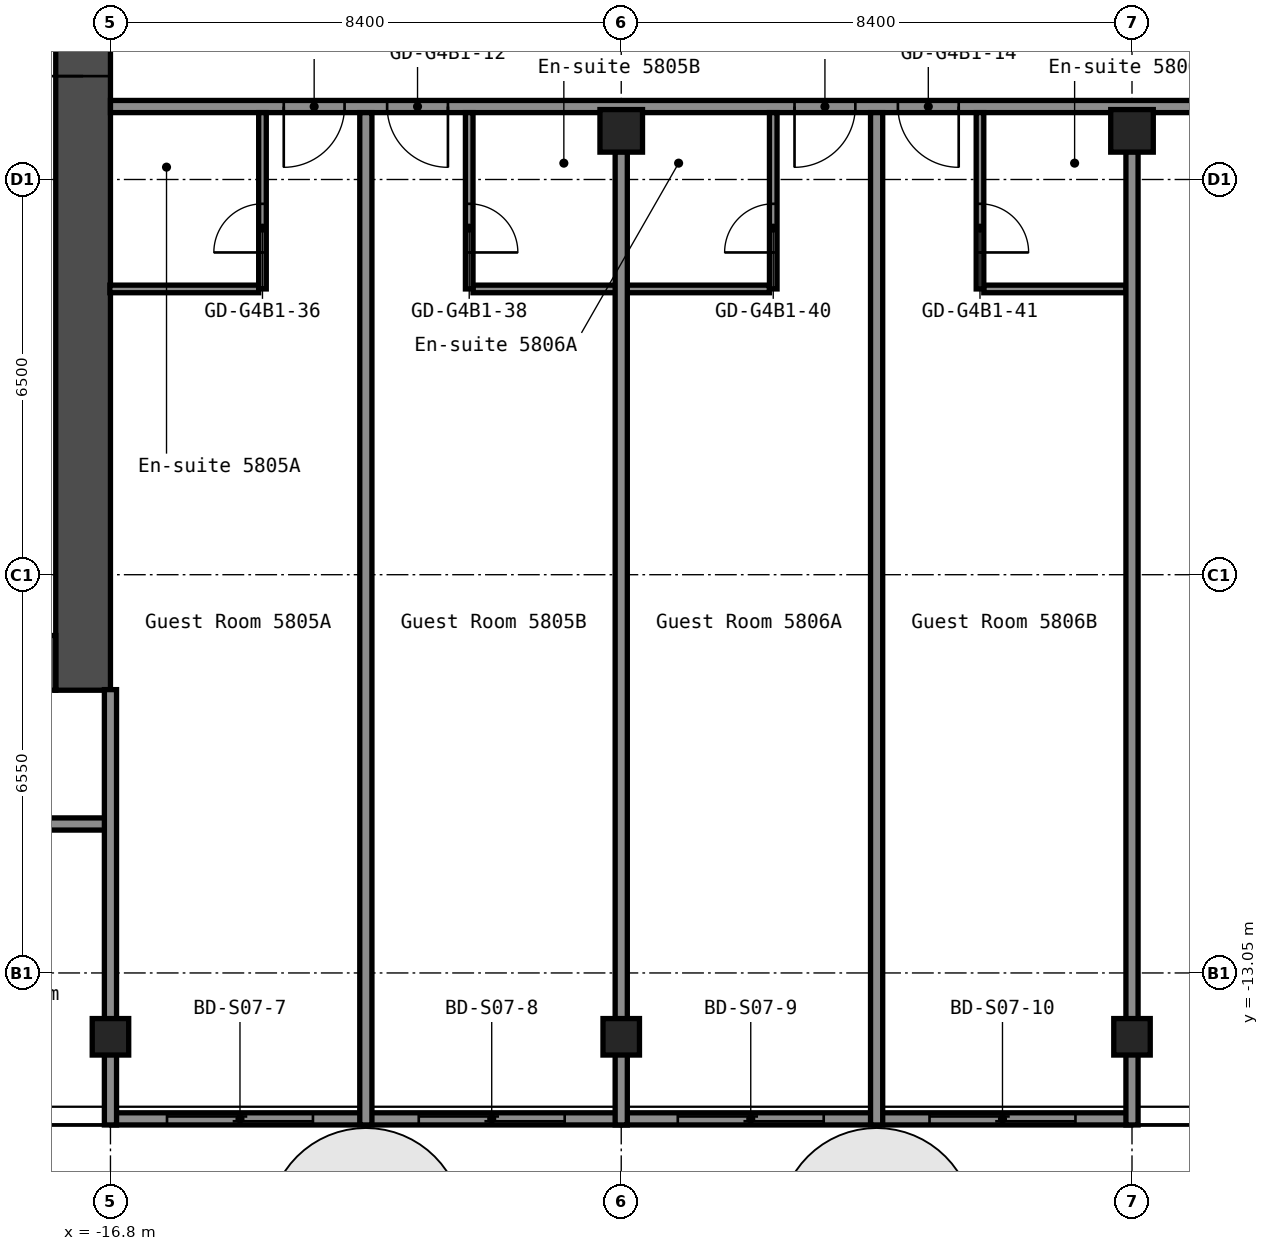
"""IFC4 building model, lengths in metres.
Left out: names, types, materials, properties, quantities, classifications, styles, units other than length and angle.
Written with IfcOpenShell. Run it as: python <this file> out.ifc"""

import sys

from ifc_helpers import new_model, si_unit, direction, frame, frame_2d, origin, origin_2d, place, context, subcontext, project, spatial, rectangle, hollow_rectangle, extrude, element, fill, save


model = new_model("IFC4")
c1 = context("Model", 3, precision=1e-05, world=origin(), true_north=direction((0.0, 1.0)))
c2 = subcontext(c1, "Body", "Model", "MODEL_VIEW")
j1 = project(units=[si_unit("LENGTHUNIT", "METRE"), si_unit("PLANEANGLEUNIT", "RADIAN")], contexts=[c1])
p1 = place(None, origin())
s1 = spatial("IfcSite", under=j1, at=p1, CompositionType="ELEMENT")
p2 = place(p1, origin())
s2 = spatial("IfcBuilding", under=s1, at=p2, CompositionType="ELEMENT")
p3 = place(p2, frame((0.0, 0.0, 205.8)))
s3 = spatial("IfcBuildingStorey", under=s2, at=p3, CompositionType="ELEMENT", Elevation=205.8)
for number, where, z_axis, x_axis in (
    (1, (-16.8, -14.1, 0.0), (0.0, 0.0, 1.0), (1.0, 0.0, 0.0)),
    (2, (-8.4, -14.1, 0.0), (0.0, 0.0, 1.0), (1.0, 0.0, 0.0)),
):
    element("IfcColumn", number, at=place(p3, frame(where, z_axis=z_axis, x_axis=x_axis)), inside=s3, PredefinedType="COLUMN", context=c2, shape_type="SweptSolid", body=[
        extrude(hollow_rectangle(XDim=0.6, YDim=0.6, WallThickness=0.025, InnerFilletRadius=0.038, OuterFilletRadius=0.062, at=origin_2d()), origin(), (0.0, 0.0, 1.0), 2.75),
    ])
p4 = place(p3, frame((-8.4, 0.8, 0.0), z_axis=(0.0, 0.0, 1.0), x_axis=(1.0, 0.0, 0.0)))
e3 = element("IfcColumn", 3, at=p4, inside=s3, PredefinedType="COLUMN", context=c2, shape_type="SweptSolid", body=[
    extrude(hollow_rectangle(XDim=0.7, YDim=0.7, WallThickness=0.028, at=origin_2d()), origin(), (0.0, 0.0, 1.0), 2.75),
])
p5 = place(p3, frame((0.0, -14.1, 0.0), z_axis=(0.0, 0.0, 1.0), x_axis=(1.0, 0.0, 0.0)))
e4 = element("IfcColumn", 4, at=p5, inside=s3, PredefinedType="COLUMN", context=c2, shape_type="SweptSolid", body=[
    extrude(hollow_rectangle(XDim=0.6, YDim=0.6, WallThickness=0.025, InnerFilletRadius=0.038, OuterFilletRadius=0.062, at=origin_2d()), origin(), (0.0, 0.0, 1.0), 2.75),
])
p6 = place(p3, frame((0.0, 0.8, 0.0), z_axis=(0.0, 0.0, 1.0), x_axis=(1.0, 0.0, 0.0)))
e5 = element("IfcColumn", 5, at=p6, inside=s3, PredefinedType="COLUMN", context=c2, shape_type="SweptSolid", body=[
    extrude(hollow_rectangle(XDim=0.7, YDim=0.7, WallThickness=0.028, at=origin_2d()), origin(), (0.0, 0.0, 1.0), 2.75),
])
p7 = place(p3, frame((-17.25, -8.4, 0.0), z_axis=(0.0, 0.0, 1.0), x_axis=(0.0, 1.0, 0.0)))
e6 = element("IfcWall", 6, at=p7, inside=s3, PredefinedType="SHEAR", context=c2, shape_type="SweptSolid", body=[
    extrude(rectangle(XDim=16.8, YDim=0.9, at=frame_2d((8.4, 0.0))), origin(), (0.0, 0.0, 1.0), 2.75),
])
p8 = place(p7, frame((10.1, 0.0, 0.0)))
e7 = element("IfcOpeningElement", 7, at=p8, cuts=e6, PredefinedType="OPENING", context=c2, shape_type="SweptSolid", body=[
    extrude(rectangle(XDim=1.6, YDim=2.1, at=frame_2d((0.8, 1.05))), frame((0.0, 0.46, 0.0), z_axis=(0.0, -1.0, 0.0), x_axis=(1.0, 0.0, 0.0)), (0.0, 0.0, 1.0), 0.92),
])
p9 = place(p3, frame((-32.7, -7.95, 0.0), z_axis=(0.0, 0.0, 1.0), x_axis=(1.0, 0.0, 0.0)))
e8 = element("IfcWall", 8, at=p9, inside=s3, PredefinedType="SHEAR", context=c2, shape_type="SweptSolid", body=[
    extrude(rectangle(XDim=15.0, YDim=0.9, at=frame_2d((7.5, 0.0))), origin(), (0.0, 0.0, 1.0), 2.75),
])
p10 = place(p9, frame((11.45, 0.0, 0.0)))
e9 = element("IfcOpeningElement", 9, at=p10, cuts=e8, PredefinedType="OPENING", context=c2, shape_type="SweptSolid", body=[
    extrude(rectangle(XDim=1.0, YDim=2.1, at=frame_2d((0.5, 1.05))), frame((0.0, 0.46, 0.0), z_axis=(0.0, -1.0, 0.0), x_axis=(1.0, 0.0, 0.0)), (0.0, 0.0, 1.0), 0.92),
])
p11 = place(p3, frame((-38.1, -10.6, 0.0), z_axis=(0.0, 0.0, 1.0), x_axis=(1.0, 0.0, 0.0)))
e10 = element("IfcWall", 10, at=p11, inside=s3, PredefinedType="PARTITIONING", context=c2, shape_type="SweptSolid", body=[
    extrude(rectangle(XDim=21.3, YDim=0.2, at=frame_2d((10.65, 0.0))), origin(), (0.0, 0.0, 1.0), 2.75),
])
p12 = place(p11, frame((1.95, 0.0, 0.0)))
e11 = element("IfcOpeningElement", 11, at=p12, cuts=e10, PredefinedType="OPENING", context=c2, shape_type="SweptSolid", body=[
    extrude(rectangle(XDim=0.9, YDim=2.1, at=frame_2d((0.45, 1.05))), frame((0.0, 0.11, 0.0), z_axis=(0.0, -1.0, 0.0), x_axis=(1.0, 0.0, 0.0)), (0.0, 0.0, 1.0), 0.22),
])
p13 = place(p11, frame((6.485, 0.0, 0.0)))
e12 = element("IfcOpeningElement", 12, at=p13, cuts=e10, PredefinedType="OPENING", context=c2, shape_type="SweptSolid", body=[
    extrude(rectangle(XDim=0.9, YDim=2.1, at=frame_2d((0.45, 1.05))), frame((0.0, 0.11, 0.0), z_axis=(0.0, -1.0, 0.0), x_axis=(1.0, 0.0, 0.0)), (0.0, 0.0, 1.0), 0.22),
])
p14 = place(p11, frame((10.685, 0.0, 0.0)))
e13 = element("IfcOpeningElement", 13, at=p14, cuts=e10, PredefinedType="OPENING", context=c2, shape_type="SweptSolid", body=[
    extrude(rectangle(XDim=0.9, YDim=2.1, at=frame_2d((0.45, 1.05))), frame((0.0, 0.11, 0.0), z_axis=(0.0, -1.0, 0.0), x_axis=(1.0, 0.0, 0.0)), (0.0, 0.0, 1.0), 0.22),
])
p15 = place(p11, frame((14.215, 0.0, 0.0)))
e14 = element("IfcOpeningElement", 14, at=p15, cuts=e10, PredefinedType="OPENING", context=c2, shape_type="SweptSolid", body=[
    extrude(rectangle(XDim=0.9, YDim=2.1, at=frame_2d((0.45, 1.05))), frame((0.0, 0.11, 0.0), z_axis=(0.0, -1.0, 0.0), x_axis=(1.0, 0.0, 0.0)), (0.0, 0.0, 1.0), 0.22),
])
p16 = place(p11, frame((18.415, 0.0, 0.0)))
e15 = element("IfcOpeningElement", 15, at=p16, cuts=e10, PredefinedType="OPENING", context=c2, shape_type="SweptSolid", body=[
    extrude(rectangle(XDim=0.9, YDim=2.1, at=frame_2d((0.45, 1.05))), frame((0.0, 0.11, 0.0), z_axis=(0.0, -1.0, 0.0), x_axis=(1.0, 0.0, 0.0)), (0.0, 0.0, 1.0), 0.22),
])
p17 = place(p3, frame((-16.81, -1.8, 0.0), z_axis=(0.0, 0.0, 1.0), x_axis=(1.0, 0.0, 0.0)))
e16 = element("IfcWall", 16, at=p17, inside=s3, PredefinedType="PARTITIONING", context=c2, shape_type="SweptSolid", body=[
    extrude(rectangle(XDim=2.448, YDim=0.125, at=frame_2d((1.224, 0.0))), origin(), (0.0, 0.0, 1.0), 2.75),
])
p18 = place(p3, frame((-10.837, -1.8, 0.0), z_axis=(0.0, 0.0, 1.0), x_axis=(1.0, 0.0, 0.0)))
e17 = element("IfcWall", 17, at=p18, inside=s3, PredefinedType="PARTITIONING", context=c2, shape_type="SweptSolid", body=[
    extrude(rectangle(XDim=4.875, YDim=0.125, at=frame_2d((2.438, 0.0))), origin(), (0.0, 0.0, 1.0), 2.75),
])
p19 = place(p3, frame((-2.438, -1.8, 0.0), z_axis=(0.0, 0.0, 1.0), x_axis=(1.0, 0.0, 0.0)))
e18 = element("IfcWall", 18, at=p19, inside=s3, PredefinedType="PARTITIONING", context=c2, shape_type="SweptSolid", body=[
    extrude(rectangle(XDim=2.337, YDim=0.125, at=frame_2d((1.169, 0.0))), origin(), (0.0, 0.0, 1.0), 2.75),
])
p20 = place(p3, frame((-16.8, 1.2, 0.0), z_axis=(0.0, 0.0, 1.0), x_axis=(1.0, 0.0, 0.0)))
e19 = element("IfcWall", 19, at=p20, inside=s3, PredefinedType="PARTITIONING", context=c2, shape_type="SweptSolid", body=[
    extrude(rectangle(XDim=33.6, YDim=0.2, at=frame_2d((16.8, 0.0))), origin(), (0.0, 0.0, 1.0), 2.75),
])
p21 = place(p20, frame((2.85, 0.0, 0.0)))
e20 = element("IfcOpeningElement", 20, at=p21, cuts=e19, PredefinedType="OPENING", context=c2, shape_type="SweptSolid", body=[
    extrude(rectangle(XDim=1.0, YDim=2.1, at=frame_2d((0.5, 1.05))), frame((0.0, 0.11, 0.0), z_axis=(0.0, -1.0, 0.0), x_axis=(1.0, 0.0, 0.0)), (0.0, 0.0, 1.0), 0.22),
])
p22 = place(p20, frame((4.55, 0.0, 0.0)))
e21 = element("IfcOpeningElement", 21, at=p22, cuts=e19, PredefinedType="OPENING", context=c2, shape_type="SweptSolid", body=[
    extrude(rectangle(XDim=1.0, YDim=2.1, at=frame_2d((0.5, 1.05))), frame((0.0, 0.11, 0.0), z_axis=(0.0, -1.0, 0.0), x_axis=(1.0, 0.0, 0.0)), (0.0, 0.0, 1.0), 0.22),
])
p23 = place(p20, frame((11.25, 0.0, 0.0)))
e22 = element("IfcOpeningElement", 22, at=p23, cuts=e19, PredefinedType="OPENING", context=c2, shape_type="SweptSolid", body=[
    extrude(rectangle(XDim=1.0, YDim=2.1, at=frame_2d((0.5, 1.05))), frame((0.0, 0.11, 0.0), z_axis=(0.0, -1.0, 0.0), x_axis=(1.0, 0.0, 0.0)), (0.0, 0.0, 1.0), 0.22),
])
p24 = place(p20, frame((12.95, 0.0, 0.0)))
e23 = element("IfcOpeningElement", 23, at=p24, cuts=e19, PredefinedType="OPENING", context=c2, shape_type="SweptSolid", body=[
    extrude(rectangle(XDim=1.0, YDim=2.1, at=frame_2d((0.5, 1.05))), frame((0.0, 0.11, 0.0), z_axis=(0.0, -1.0, 0.0), x_axis=(1.0, 0.0, 0.0)), (0.0, 0.0, 1.0), 0.22),
])
p25 = place(p20, frame((20.5, 0.0, 0.0)))
e24 = element("IfcOpeningElement", 24, at=p25, cuts=e19, PredefinedType="OPENING", context=c2, shape_type="SweptSolid", body=[
    extrude(rectangle(XDim=1.0, YDim=2.1, at=frame_2d((0.5, 1.05))), frame((0.0, 0.11, 0.0), z_axis=(0.0, -1.0, 0.0), x_axis=(1.0, 0.0, 0.0)), (0.0, 0.0, 1.0), 0.22),
])
p26 = place(p20, frame((28.05, 0.0, 0.0)))
e25 = element("IfcOpeningElement", 25, at=p26, cuts=e19, PredefinedType="OPENING", context=c2, shape_type="SweptSolid", body=[
    extrude(rectangle(XDim=1.0, YDim=2.1, at=frame_2d((0.5, 1.05))), frame((0.0, 0.11, 0.0), z_axis=(0.0, -1.0, 0.0), x_axis=(1.0, 0.0, 0.0)), (0.0, 0.0, 1.0), 0.22),
])
p27 = place(p20, frame((29.75, 0.0, 0.0)))
e26 = element("IfcOpeningElement", 26, at=p27, cuts=e19, PredefinedType="OPENING", context=c2, shape_type="SweptSolid", body=[
    extrude(rectangle(XDim=1.0, YDim=2.1, at=frame_2d((0.5, 1.05))), frame((0.0, 0.11, 0.0), z_axis=(0.0, -1.0, 0.0), x_axis=(1.0, 0.0, 0.0)), (0.0, 0.0, 1.0), 0.22),
])
p28 = place(p3, frame((-16.8, -15.55, 0.0), z_axis=(0.0, 0.0, 1.0), x_axis=(0.0, 1.0, 0.0)))
e27 = element("IfcWall", 27, at=p28, inside=s3, PredefinedType="PARTITIONING", context=c2, shape_type="SweptSolid", body=[
    extrude(rectangle(XDim=7.16, YDim=0.2, at=frame_2d((3.58, 0.0))), origin(), (0.0, 0.0, 1.0), 2.75),
])
p29 = place(p3, frame((-14.3, -1.8, 0.0), z_axis=(0.0, 0.0, 1.0), x_axis=(0.0, 1.0, 0.0)))
e28 = element("IfcWall", 28, at=p29, inside=s3, PredefinedType="PARTITIONING", context=c2, shape_type="SweptSolid", body=[
    extrude(rectangle(XDim=2.9, YDim=0.125, at=frame_2d((1.45, 0.0))), origin(), (0.0, 0.0, 1.0), 2.75),
])
p30 = place(p29, frame((0.6, 0.0, 0.0)))
e29 = element("IfcOpeningElement", 29, at=p30, cuts=e28, PredefinedType="OPENING", context=c2, shape_type="SweptSolid", body=[
    extrude(rectangle(XDim=0.8, YDim=2.1, at=frame_2d((0.4, 1.05))), frame((0.0, 0.073, 0.0), z_axis=(0.0, -1.0, 0.0), x_axis=(1.0, 0.0, 0.0)), (0.0, 0.0, 1.0), 0.145),
])
p31 = place(p3, frame((-12.6, -15.55, 0.0), z_axis=(0.0, 0.0, 1.0), x_axis=(0.0, 1.0, 0.0)))
e30 = element("IfcWall", 30, at=p31, inside=s3, PredefinedType="PARTITIONING", context=c2, shape_type="SweptSolid", body=[
    extrude(rectangle(XDim=16.65, YDim=0.2, at=frame_2d((8.325, 0.0))), origin(), (0.0, 0.0, 1.0), 2.75),
])
p32 = place(p3, frame((-10.9, -1.8, 0.0), z_axis=(0.0, 0.0, 1.0), x_axis=(0.0, 1.0, 0.0)))
e31 = element("IfcWall", 31, at=p32, inside=s3, PredefinedType="PARTITIONING", context=c2, shape_type="SweptSolid", body=[
    extrude(rectangle(XDim=2.9, YDim=0.125, at=frame_2d((1.45, 0.0))), origin(), (0.0, 0.0, 1.0), 2.75),
])
p33 = place(p32, frame((0.6, 0.0, 0.0)))
e32 = element("IfcOpeningElement", 32, at=p33, cuts=e31, PredefinedType="OPENING", context=c2, shape_type="SweptSolid", body=[
    extrude(rectangle(XDim=0.8, YDim=2.1, at=frame_2d((0.4, 1.05))), frame((0.0, 0.073, 0.0), z_axis=(0.0, -1.0, 0.0), x_axis=(1.0, 0.0, 0.0)), (0.0, 0.0, 1.0), 0.145),
])
p34 = place(p3, frame((-8.4, -15.55, 0.0), z_axis=(0.0, 0.0, 1.0), x_axis=(0.0, 1.0, 0.0)))
e33 = element("IfcWall", 33, at=p34, inside=s3, PredefinedType="PARTITIONING", context=c2, shape_type="SweptSolid", body=[
    extrude(rectangle(XDim=16.01, YDim=0.2, at=frame_2d((8.005, 0.0))), origin(), (0.0, 0.0, 1.0), 2.75),
])
p35 = place(p3, frame((-5.9, -1.8, 0.0), z_axis=(0.0, 0.0, 1.0), x_axis=(0.0, 1.0, 0.0)))
e34 = element("IfcWall", 34, at=p35, inside=s3, PredefinedType="PARTITIONING", context=c2, shape_type="SweptSolid", body=[
    extrude(rectangle(XDim=2.9, YDim=0.125, at=frame_2d((1.45, 0.0))), origin(), (0.0, 0.0, 1.0), 2.75),
])
p36 = place(p35, frame((0.6, 0.0, 0.0)))
e35 = element("IfcOpeningElement", 35, at=p36, cuts=e34, PredefinedType="OPENING", context=c2, shape_type="SweptSolid", body=[
    extrude(rectangle(XDim=0.8, YDim=2.1, at=frame_2d((0.4, 1.05))), frame((0.0, 0.073, 0.0), z_axis=(0.0, -1.0, 0.0), x_axis=(1.0, 0.0, 0.0)), (0.0, 0.0, 1.0), 0.145),
])
p37 = place(p3, frame((-4.2, -15.55, 0.0), z_axis=(0.0, 0.0, 1.0), x_axis=(0.0, 1.0, 0.0)))
e36 = element("IfcWall", 36, at=p37, inside=s3, PredefinedType="PARTITIONING", context=c2, shape_type="SweptSolid", body=[
    extrude(rectangle(XDim=16.65, YDim=0.2, at=frame_2d((8.325, 0.0))), origin(), (0.0, 0.0, 1.0), 2.75),
])
p38 = place(p3, frame((-2.5, -1.8, 0.0), z_axis=(0.0, 0.0, 1.0), x_axis=(0.0, 1.0, 0.0)))
e37 = element("IfcWall", 37, at=p38, inside=s3, PredefinedType="PARTITIONING", context=c2, shape_type="SweptSolid", body=[
    extrude(rectangle(XDim=2.9, YDim=0.125, at=frame_2d((1.45, 0.0))), origin(), (0.0, 0.0, 1.0), 2.75),
])
p39 = place(p38, frame((0.6, 0.0, 0.0)))
e38 = element("IfcOpeningElement", 38, at=p39, cuts=e37, PredefinedType="OPENING", context=c2, shape_type="SweptSolid", body=[
    extrude(rectangle(XDim=0.8, YDim=2.1, at=frame_2d((0.4, 1.05))), frame((0.0, 0.073, 0.0), z_axis=(0.0, -1.0, 0.0), x_axis=(1.0, 0.0, 0.0)), (0.0, 0.0, 1.0), 0.145),
])
p40 = place(p3, frame((0.0, -15.55, 0.0), z_axis=(0.0, 0.0, 1.0), x_axis=(0.0, 1.0, 0.0)))
e39 = element("IfcWall", 39, at=p40, inside=s3, PredefinedType="PARTITIONING", context=c2, shape_type="SweptSolid", body=[
    extrude(rectangle(XDim=16.01, YDim=0.2, at=frame_2d((8.005, 0.0))), origin(), (0.0, 0.0, 1.0), 2.75),
])
p41 = place(p3, frame((-16.78, -15.45, 0.0), z_axis=(0.0, 0.0, 1.0), x_axis=(1.0, 0.0, 0.0)))
p42 = place(p41, frame((0.91, 0.0, 0.0)))
p43 = place(p42, frame((2.4, 0.0, 0.0), z_axis=(0.0, 0.0, 1.0), x_axis=(-1.0, 0.0, 0.0)))
e40 = element("IfcDoor", 40, at=p43, inside=s3, OperationType="SLIDING_TO_LEFT", PredefinedType="DOOR", context=c2, shape_type="SweptSolid", body=[
    extrude(rectangle(XDim=2.4, YDim=2.2, at=frame_2d((1.2, 1.1))), frame((0.0, 0.025, 0.0), z_axis=(0.0, -1.0, 0.0), x_axis=(1.0, 0.0, 0.0)), (0.0, 0.0, 1.0), 0.05),
])
p44 = place(p3, frame((-12.64, -15.45, 0.0), z_axis=(0.0, 0.0, 1.0), x_axis=(1.0, 0.0, 0.0)))
p45 = place(p44, frame((0.91, 0.0, 0.0)))
p46 = place(p45, frame((2.4, 0.0, 0.0), z_axis=(0.0, 0.0, 1.0), x_axis=(-1.0, 0.0, 0.0)))
e41 = element("IfcDoor", 41, at=p46, inside=s3, OperationType="SLIDING_TO_LEFT", PredefinedType="DOOR", context=c2, shape_type="SweptSolid", body=[
    extrude(rectangle(XDim=2.4, YDim=2.2, at=frame_2d((1.2, 1.1))), frame((0.0, 0.025, 0.0), z_axis=(0.0, -1.0, 0.0), x_axis=(1.0, 0.0, 0.0)), (0.0, 0.0, 1.0), 0.05),
])
p47 = place(p3, frame((-8.38, -15.45, 0.0), z_axis=(0.0, 0.0, 1.0), x_axis=(1.0, 0.0, 0.0)))
p48 = place(p47, frame((0.91, 0.0, 0.0)))
p49 = place(p48, frame((2.4, 0.0, 0.0), z_axis=(0.0, 0.0, 1.0), x_axis=(-1.0, 0.0, 0.0)))
e42 = element("IfcDoor", 42, at=p49, inside=s3, OperationType="SLIDING_TO_LEFT", PredefinedType="DOOR", context=c2, shape_type="SweptSolid", body=[
    extrude(rectangle(XDim=2.4, YDim=2.2, at=frame_2d((1.2, 1.1))), frame((0.0, 0.025, 0.0), z_axis=(0.0, -1.0, 0.0), x_axis=(1.0, 0.0, 0.0)), (0.0, 0.0, 1.0), 0.05),
])
p50 = place(p3, frame((-4.24, -15.45, 0.0), z_axis=(0.0, 0.0, 1.0), x_axis=(1.0, 0.0, 0.0)))
p51 = place(p50, frame((0.91, 0.0, 0.0)))
p52 = place(p51, frame((2.4, 0.0, 0.0), z_axis=(0.0, 0.0, 1.0), x_axis=(-1.0, 0.0, 0.0)))
e43 = element("IfcDoor", 43, at=p52, inside=s3, OperationType="SLIDING_TO_LEFT", PredefinedType="DOOR", context=c2, shape_type="SweptSolid", body=[
    extrude(rectangle(XDim=2.4, YDim=2.2, at=frame_2d((1.2, 1.1))), frame((0.0, 0.025, 0.0), z_axis=(0.0, -1.0, 0.0), x_axis=(1.0, 0.0, 0.0)), (0.0, 0.0, 1.0), 0.05),
])
p53 = place(p8, origin())
e44 = element("IfcDoor", 44, at=p53, inside=s3, OperationType="DOUBLE_DOOR_SINGLE_SWING", PredefinedType="DOOR", context=c2, shape_type="SweptSolid", body=[
    extrude(rectangle(XDim=1.6, YDim=2.1, at=frame_2d((0.8, 1.05))), frame((0.0, 0.025, 0.0), z_axis=(0.0, -1.0, 0.0), x_axis=(1.0, 0.0, 0.0)), (0.0, 0.0, 1.0), 0.05),
])
fill(e7, e44)
p54 = place(p21, origin())
e45 = element("IfcDoor", 45, at=p54, inside=s3, OperationType="SINGLE_SWING_LEFT", PredefinedType="DOOR", context=c2, shape_type="SweptSolid", body=[
    extrude(rectangle(XDim=1.0, YDim=2.1, at=frame_2d((0.5, 1.05))), frame((0.0, 0.025, 0.0), z_axis=(0.0, -1.0, 0.0), x_axis=(1.0, 0.0, 0.0)), (0.0, 0.0, 1.0), 0.05),
])
fill(e20, e45)
p55 = place(p22, origin())
e46 = element("IfcDoor", 46, at=p55, inside=s3, OperationType="SINGLE_SWING_RIGHT", PredefinedType="DOOR", context=c2, shape_type="SweptSolid", body=[
    extrude(rectangle(XDim=1.0, YDim=2.1, at=frame_2d((0.5, 1.05))), frame((0.0, 0.025, 0.0), z_axis=(0.0, -1.0, 0.0), x_axis=(1.0, 0.0, 0.0)), (0.0, 0.0, 1.0), 0.05),
])
fill(e21, e46)
p56 = place(p23, origin())
e47 = element("IfcDoor", 47, at=p56, inside=s3, OperationType="SINGLE_SWING_LEFT", PredefinedType="DOOR", context=c2, shape_type="SweptSolid", body=[
    extrude(rectangle(XDim=1.0, YDim=2.1, at=frame_2d((0.5, 1.05))), frame((0.0, 0.025, 0.0), z_axis=(0.0, -1.0, 0.0), x_axis=(1.0, 0.0, 0.0)), (0.0, 0.0, 1.0), 0.05),
])
fill(e22, e47)
p57 = place(p24, origin())
e48 = element("IfcDoor", 48, at=p57, inside=s3, OperationType="SINGLE_SWING_RIGHT", PredefinedType="DOOR", context=c2, shape_type="SweptSolid", body=[
    extrude(rectangle(XDim=1.0, YDim=2.1, at=frame_2d((0.5, 1.05))), frame((0.0, 0.025, 0.0), z_axis=(0.0, -1.0, 0.0), x_axis=(1.0, 0.0, 0.0)), (0.0, 0.0, 1.0), 0.05),
])
fill(e23, e48)
p58 = place(p30, origin())
e49 = element("IfcDoor", 49, at=p58, inside=s3, OperationType="SINGLE_SWING_RIGHT", PredefinedType="DOOR", context=c2, shape_type="SweptSolid", body=[
    extrude(rectangle(XDim=0.8, YDim=2.1, at=frame_2d((0.4, 1.05))), frame((0.0, 0.025, 0.0), z_axis=(0.0, -1.0, 0.0), x_axis=(1.0, 0.0, 0.0)), (0.0, 0.0, 1.0), 0.05),
])
fill(e29, e49)
p59 = place(p33, origin())
e50 = element("IfcDoor", 50, at=p59, inside=s3, OperationType="SINGLE_SWING_LEFT", PredefinedType="DOOR", context=c2, shape_type="SweptSolid", body=[
    extrude(rectangle(XDim=0.8, YDim=2.1, at=frame_2d((0.4, 1.05))), frame((0.0, 0.025, 0.0), z_axis=(0.0, -1.0, 0.0), x_axis=(1.0, 0.0, 0.0)), (0.0, 0.0, 1.0), 0.05),
])
fill(e32, e50)
p60 = place(p36, origin())
e51 = element("IfcDoor", 51, at=p60, inside=s3, OperationType="SINGLE_SWING_RIGHT", PredefinedType="DOOR", context=c2, shape_type="SweptSolid", body=[
    extrude(rectangle(XDim=0.8, YDim=2.1, at=frame_2d((0.4, 1.05))), frame((0.0, 0.025, 0.0), z_axis=(0.0, -1.0, 0.0), x_axis=(1.0, 0.0, 0.0)), (0.0, 0.0, 1.0), 0.05),
])
fill(e35, e51)
p61 = place(p39, origin())
e52 = element("IfcDoor", 52, at=p61, inside=s3, OperationType="SINGLE_SWING_LEFT", PredefinedType="DOOR", context=c2, shape_type="SweptSolid", body=[
    extrude(rectangle(XDim=0.8, YDim=2.1, at=frame_2d((0.4, 1.05))), frame((0.0, 0.025, 0.0), z_axis=(0.0, -1.0, 0.0), x_axis=(1.0, 0.0, 0.0)), (0.0, 0.0, 1.0), 0.05),
])
fill(e38, e52)
save(model, sys.argv[1])
